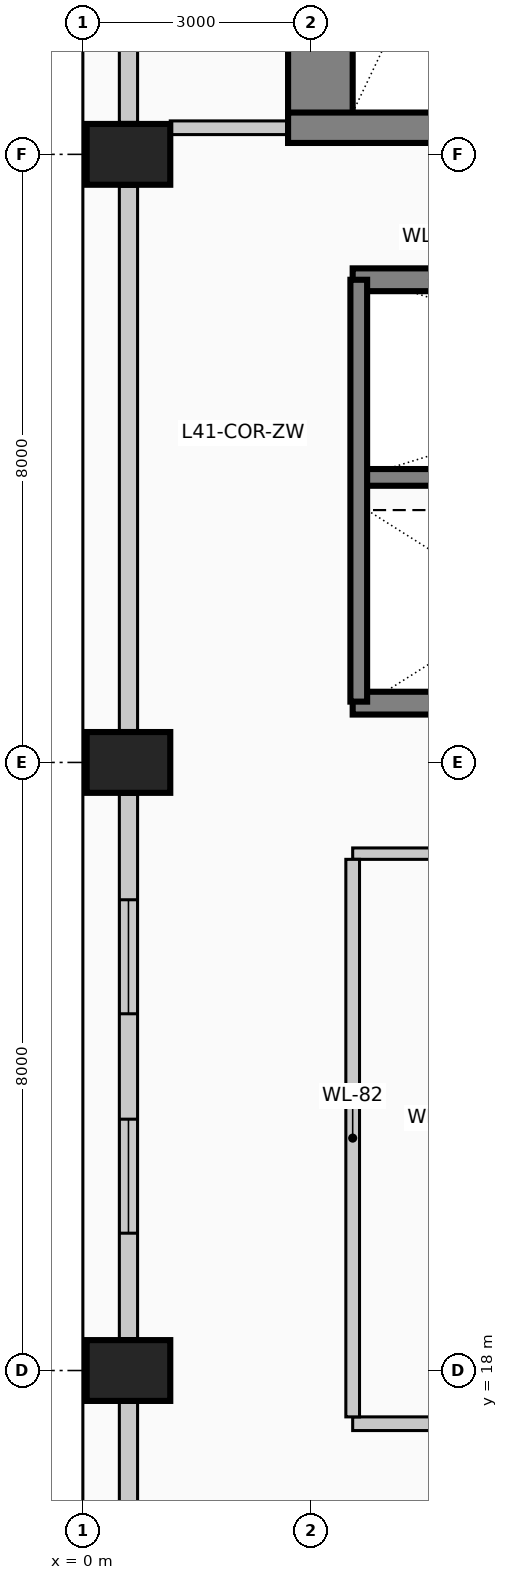
"""IFC4 building model, lengths in metres.
Left out: names, types, materials, properties, quantities, classifications, styles, units other than length and angle.
Written with IfcOpenShell. Run it as: python <this file> out.ifc"""

import sys

from ifc_helpers import new_model, si_unit, direction, frame, frame_2d, origin, origin_2d, place, context, subcontext, project, spatial, rectangle, extrude, element, fill, save


model = new_model("IFC4")
c1 = context("Model", 3, precision=1e-05, world=origin(), true_north=direction((0.0, 1.0)))
c2 = subcontext(c1, "Body", "Model", "MODEL_VIEW")
j1 = project(units=[si_unit("LENGTHUNIT", "METRE"), si_unit("PLANEANGLEUNIT", "RADIAN")], contexts=[c1])
p1 = place(None, origin())
s1 = spatial("IfcSite", under=j1, at=p1, CompositionType="ELEMENT")
p2 = place(p1, origin())
s2 = spatial("IfcBuilding", under=s1, at=p2, CompositionType="ELEMENT")
p3 = place(p2, frame((0.0, 0.0, 170.6)))
s3 = spatial("IfcBuildingStorey", under=s2, at=p3, CompositionType="ELEMENT", Elevation=170.6)
p4 = place(p3, frame((3.125, 34.15, 0.0), z_axis=(0.0, 0.0, 1.0), x_axis=(0.0, 1.0, 0.0)))
e1 = element("IfcWall", 1, at=p4, inside=s3, PredefinedType="SHEAR", context=c2, shape_type="SweptSolid", body=[
    extrude(rectangle(XDim=9.13, YDim=0.85, at=frame_2d((4.565, 0.0))), origin(), (0.0, 0.0, 1.0), 4.0),
])
p5 = place(p3, frame((2.7, 34.35, 0.0), z_axis=(0.0, 0.0, 1.0), x_axis=(1.0, 0.0, 0.0)))
e2 = element("IfcWall", 2, at=p5, inside=s3, PredefinedType="SHEAR", context=c2, shape_type="SweptSolid", body=[
    extrude(rectangle(XDim=5.01, YDim=0.4, at=frame_2d((2.505, 0.0))), origin(), (0.0, 0.0, 1.0), 4.0),
])
p6 = place(p5, frame((2.4, 0.0, 0.0)))
e3 = element("IfcOpeningElement", 3, at=p6, cuts=e2, PredefinedType="OPENING", context=c2, shape_type="SweptSolid", body=[
    extrude(rectangle(XDim=1.15, YDim=2.2, at=frame_2d((0.575, 1.1))), frame((0.0, 0.21, 0.0), z_axis=(0.0, -1.0, 0.0), x_axis=(1.0, 0.0, 0.0)), (0.0, 0.0, 1.0), 0.42),
])
for number, where, z_axis, x_axis in (
    (4, (0.6, 18.0, 0.0), (0.0, 0.0, 1.0), (0.0, 1.0, 0.0)),
    (5, (0.6, 26.0, 0.0), (0.0, 0.0, 1.0), (0.0, 1.0, 0.0)),
    (6, (0.6, 34.0, 0.0), (0.0, 0.0, 1.0), (0.0, 1.0, 0.0)),
):
    element("IfcColumn", number, at=place(p3, frame(where, z_axis=z_axis, x_axis=x_axis)), inside=s3, PredefinedType="COLUMN", context=c2, shape_type="SweptSolid", body=[
        extrude(rectangle(XDim=0.8, YDim=1.1, at=origin_2d()), origin(), (0.0, 0.0, 1.0), 4.0),
    ])
p7 = place(p3, frame((0.6, 10.42, 0.0), z_axis=(0.0, 0.0, 1.0), x_axis=(0.0, 1.0, 0.0)))
e7 = element("IfcWall", 7, at=p7, inside=s3, PredefinedType="SOLIDWALL", context=c2, shape_type="SweptSolid", body=[
    extrude(rectangle(XDim=7.16, YDim=0.24, at=frame_2d((3.58, 0.0))), origin(), (0.0, 0.0, 1.0), 2.975),
])
p8 = place(p7, frame((1.387, 0.0, 0.42)))
e8 = element("IfcOpeningElement", 8, at=p8, cuts=e7, PredefinedType="OPENING", context=c2, shape_type="SweptSolid", body=[
    extrude(rectangle(XDim=1.5, YDim=2.2, at=frame_2d((0.75, 1.1))), frame((0.0, 0.13, 0.0), z_axis=(0.0, -1.0, 0.0), x_axis=(1.0, 0.0, 0.0)), (0.0, 0.0, 1.0), 0.26),
])
p9 = place(p3, frame((0.6, 18.42, 0.0), z_axis=(0.0, 0.0, 1.0), x_axis=(0.0, 1.0, 0.0)))
e9 = element("IfcWall", 9, at=p9, inside=s3, PredefinedType="SOLIDWALL", context=c2, shape_type="SweptSolid", body=[
    extrude(rectangle(XDim=7.16, YDim=0.24, at=frame_2d((3.58, 0.0))), origin(), (0.0, 0.0, 1.0), 2.975),
])
p10 = place(p9, frame((1.387, 0.0, 0.42)))
e10 = element("IfcOpeningElement", 10, at=p10, cuts=e9, PredefinedType="OPENING", context=c2, shape_type="SweptSolid", body=[
    extrude(rectangle(XDim=1.5, YDim=2.2, at=frame_2d((0.75, 1.1))), frame((0.0, 0.13, 0.0), z_axis=(0.0, -1.0, 0.0), x_axis=(1.0, 0.0, 0.0)), (0.0, 0.0, 1.0), 0.26),
])
p11 = place(p9, frame((4.273, 0.0, 0.42)))
e11 = element("IfcOpeningElement", 11, at=p11, cuts=e9, PredefinedType="OPENING", context=c2, shape_type="SweptSolid", body=[
    extrude(rectangle(XDim=1.5, YDim=2.2, at=frame_2d((0.75, 1.1))), frame((0.0, 0.13, 0.0), z_axis=(0.0, -1.0, 0.0), x_axis=(1.0, 0.0, 0.0)), (0.0, 0.0, 1.0), 0.26),
])
p12 = place(p3, frame((0.6, 26.42, 0.0), z_axis=(0.0, 0.0, 1.0), x_axis=(0.0, 1.0, 0.0)))
e12 = element("IfcWall", 12, at=p12, inside=s3, PredefinedType="SOLIDWALL", context=c2, shape_type="SweptSolid", body=[
    extrude(rectangle(XDim=7.16, YDim=0.24, at=frame_2d((3.58, 0.0))), origin(), (0.0, 0.0, 1.0), 2.975),
])
p13 = place(p3, frame((0.6, 34.42, 0.0), z_axis=(0.0, 0.0, 1.0), x_axis=(0.0, 1.0, 0.0)))
e13 = element("IfcWall", 13, at=p13, inside=s3, PredefinedType="SOLIDWALL", context=c2, shape_type="SweptSolid", body=[
    extrude(rectangle(XDim=7.56, YDim=0.24, at=frame_2d((3.78, 0.0))), origin(), (0.0, 0.0, 1.0), 2.975),
])
for number, where, z_axis, x_axis in (
    (14, (3.55, 32.35, 0.0), (0.0, 0.0, 1.0), (1.0, 0.0, 0.0)),
    (15, (5.65, 26.78, 0.0), (0.0, 0.0, 1.0), (-1.0, 0.0, 0.0)),
):
    element("IfcWall", number, at=place(p3, frame(where, z_axis=z_axis, x_axis=x_axis)), inside=s3, PredefinedType="SOLIDWALL", context=c2, shape_type="SweptSolid", body=[
        extrude(rectangle(XDim=2.1, YDim=0.3, at=frame_2d((1.05, 0.0))), origin(), (0.0, 0.0, 1.0), 4.0),
    ])
p14 = place(p3, frame((3.55, 29.75, 0.0), z_axis=(0.0, 0.0, 1.0), x_axis=(1.0, 0.0, 0.0)))
e16 = element("IfcWall", 16, at=p14, inside=s3, PredefinedType="SOLIDWALL", context=c2, shape_type="SweptSolid", body=[
    extrude(rectangle(XDim=8.65, YDim=0.22, at=frame_2d((4.325, 0.0))), origin(), (0.0, 0.0, 1.0), 4.0),
])
p15 = place(p3, frame((3.63, 26.8, 0.0), z_axis=(0.0, 0.0, 1.0), x_axis=(0.0, 1.0, 0.0)))
e17 = element("IfcWall", 17, at=p15, inside=s3, PredefinedType="SOLIDWALL", context=c2, shape_type="SweptSolid", body=[
    extrude(rectangle(XDim=5.55, YDim=0.22, at=frame_2d((2.775, 0.0))), origin(), (0.0, 0.0, 1.0), 4.0),
])
p16 = place(p3, frame((3.55, 17.3, 0.0), z_axis=(0.0, 0.0, 1.0), x_axis=(1.0, 0.0, 0.0)))
e18 = element("IfcWall", 18, at=p16, inside=s3, PredefinedType="PARTITIONING", context=c2, shape_type="SweptSolid", body=[
    extrude(rectangle(XDim=6.25, YDim=0.18, at=frame_2d((3.125, 0.0))), origin(), (0.0, 0.0, 1.0), 3.725),
])
p17 = place(p16, frame((2.6, 0.0, 0.0)))
e19 = element("IfcOpeningElement", 19, at=p17, cuts=e18, PredefinedType="OPENING", context=c2, shape_type="SweptSolid", body=[
    extrude(rectangle(XDim=1.05, YDim=2.15, at=frame_2d((0.525, 1.075))), frame((0.0, 0.1, 0.0), z_axis=(0.0, -1.0, 0.0), x_axis=(1.0, 0.0, 0.0)), (0.0, 0.0, 1.0), 0.2),
])
p18 = place(p3, frame((3.55, 24.8, 0.0), z_axis=(0.0, 0.0, 1.0), x_axis=(1.0, 0.0, 0.0)))
e20 = element("IfcWall", 20, at=p18, inside=s3, PredefinedType="PARTITIONING", context=c2, shape_type="SweptSolid", body=[
    extrude(rectangle(XDim=6.25, YDim=0.15, at=frame_2d((3.125, 0.0))), origin(), (0.0, 0.0, 1.0), 3.725),
])
p19 = place(p3, frame((1.15, 34.35, 0.0), z_axis=(0.0, 0.0, 1.0), x_axis=(1.0, 0.0, 0.0)))
e21 = element("IfcWall", 21, at=p19, inside=s3, PredefinedType="PARTITIONING", context=c2, shape_type="SweptSolid", body=[
    extrude(rectangle(XDim=1.55, YDim=0.18, at=frame_2d((0.775, 0.0))), origin(), (0.0, 0.0, 1.0), 3.725),
])
p20 = place(p3, frame((3.55, 17.39, 0.0), z_axis=(0.0, 0.0, 1.0), x_axis=(0.0, 1.0, 0.0)))
e22 = element("IfcWall", 22, at=p20, inside=s3, PredefinedType="PARTITIONING", context=c2, shape_type="SweptSolid", body=[
    extrude(rectangle(XDim=7.335, YDim=0.18, at=frame_2d((3.667, 0.0))), origin(), (0.0, 0.0, 1.0), 3.725),
])
p21 = place(p10, origin())
e23 = element("IfcWindow", 23, at=p21, inside=s3, PartitioningType="SINGLE_PANEL", PredefinedType="WINDOW", context=c2, shape_type="SweptSolid", body=[
    extrude(rectangle(XDim=1.5, YDim=2.2, at=frame_2d((0.75, 1.1))), frame((0.0, 0.03, 0.0), z_axis=(0.0, -1.0, 0.0), x_axis=(1.0, 0.0, 0.0)), (0.0, 0.0, 1.0), 0.06),
])
fill(e10, e23)
p22 = place(p11, origin())
e24 = element("IfcWindow", 24, at=p22, inside=s3, PartitioningType="SINGLE_PANEL", PredefinedType="WINDOW", context=c2, shape_type="SweptSolid", body=[
    extrude(rectangle(XDim=1.5, YDim=2.2, at=frame_2d((0.75, 1.1))), frame((0.0, 0.03, 0.0), z_axis=(0.0, -1.0, 0.0), x_axis=(1.0, 0.0, 0.0)), (0.0, 0.0, 1.0), 0.06),
])
fill(e11, e24)
save(model, sys.argv[1])
